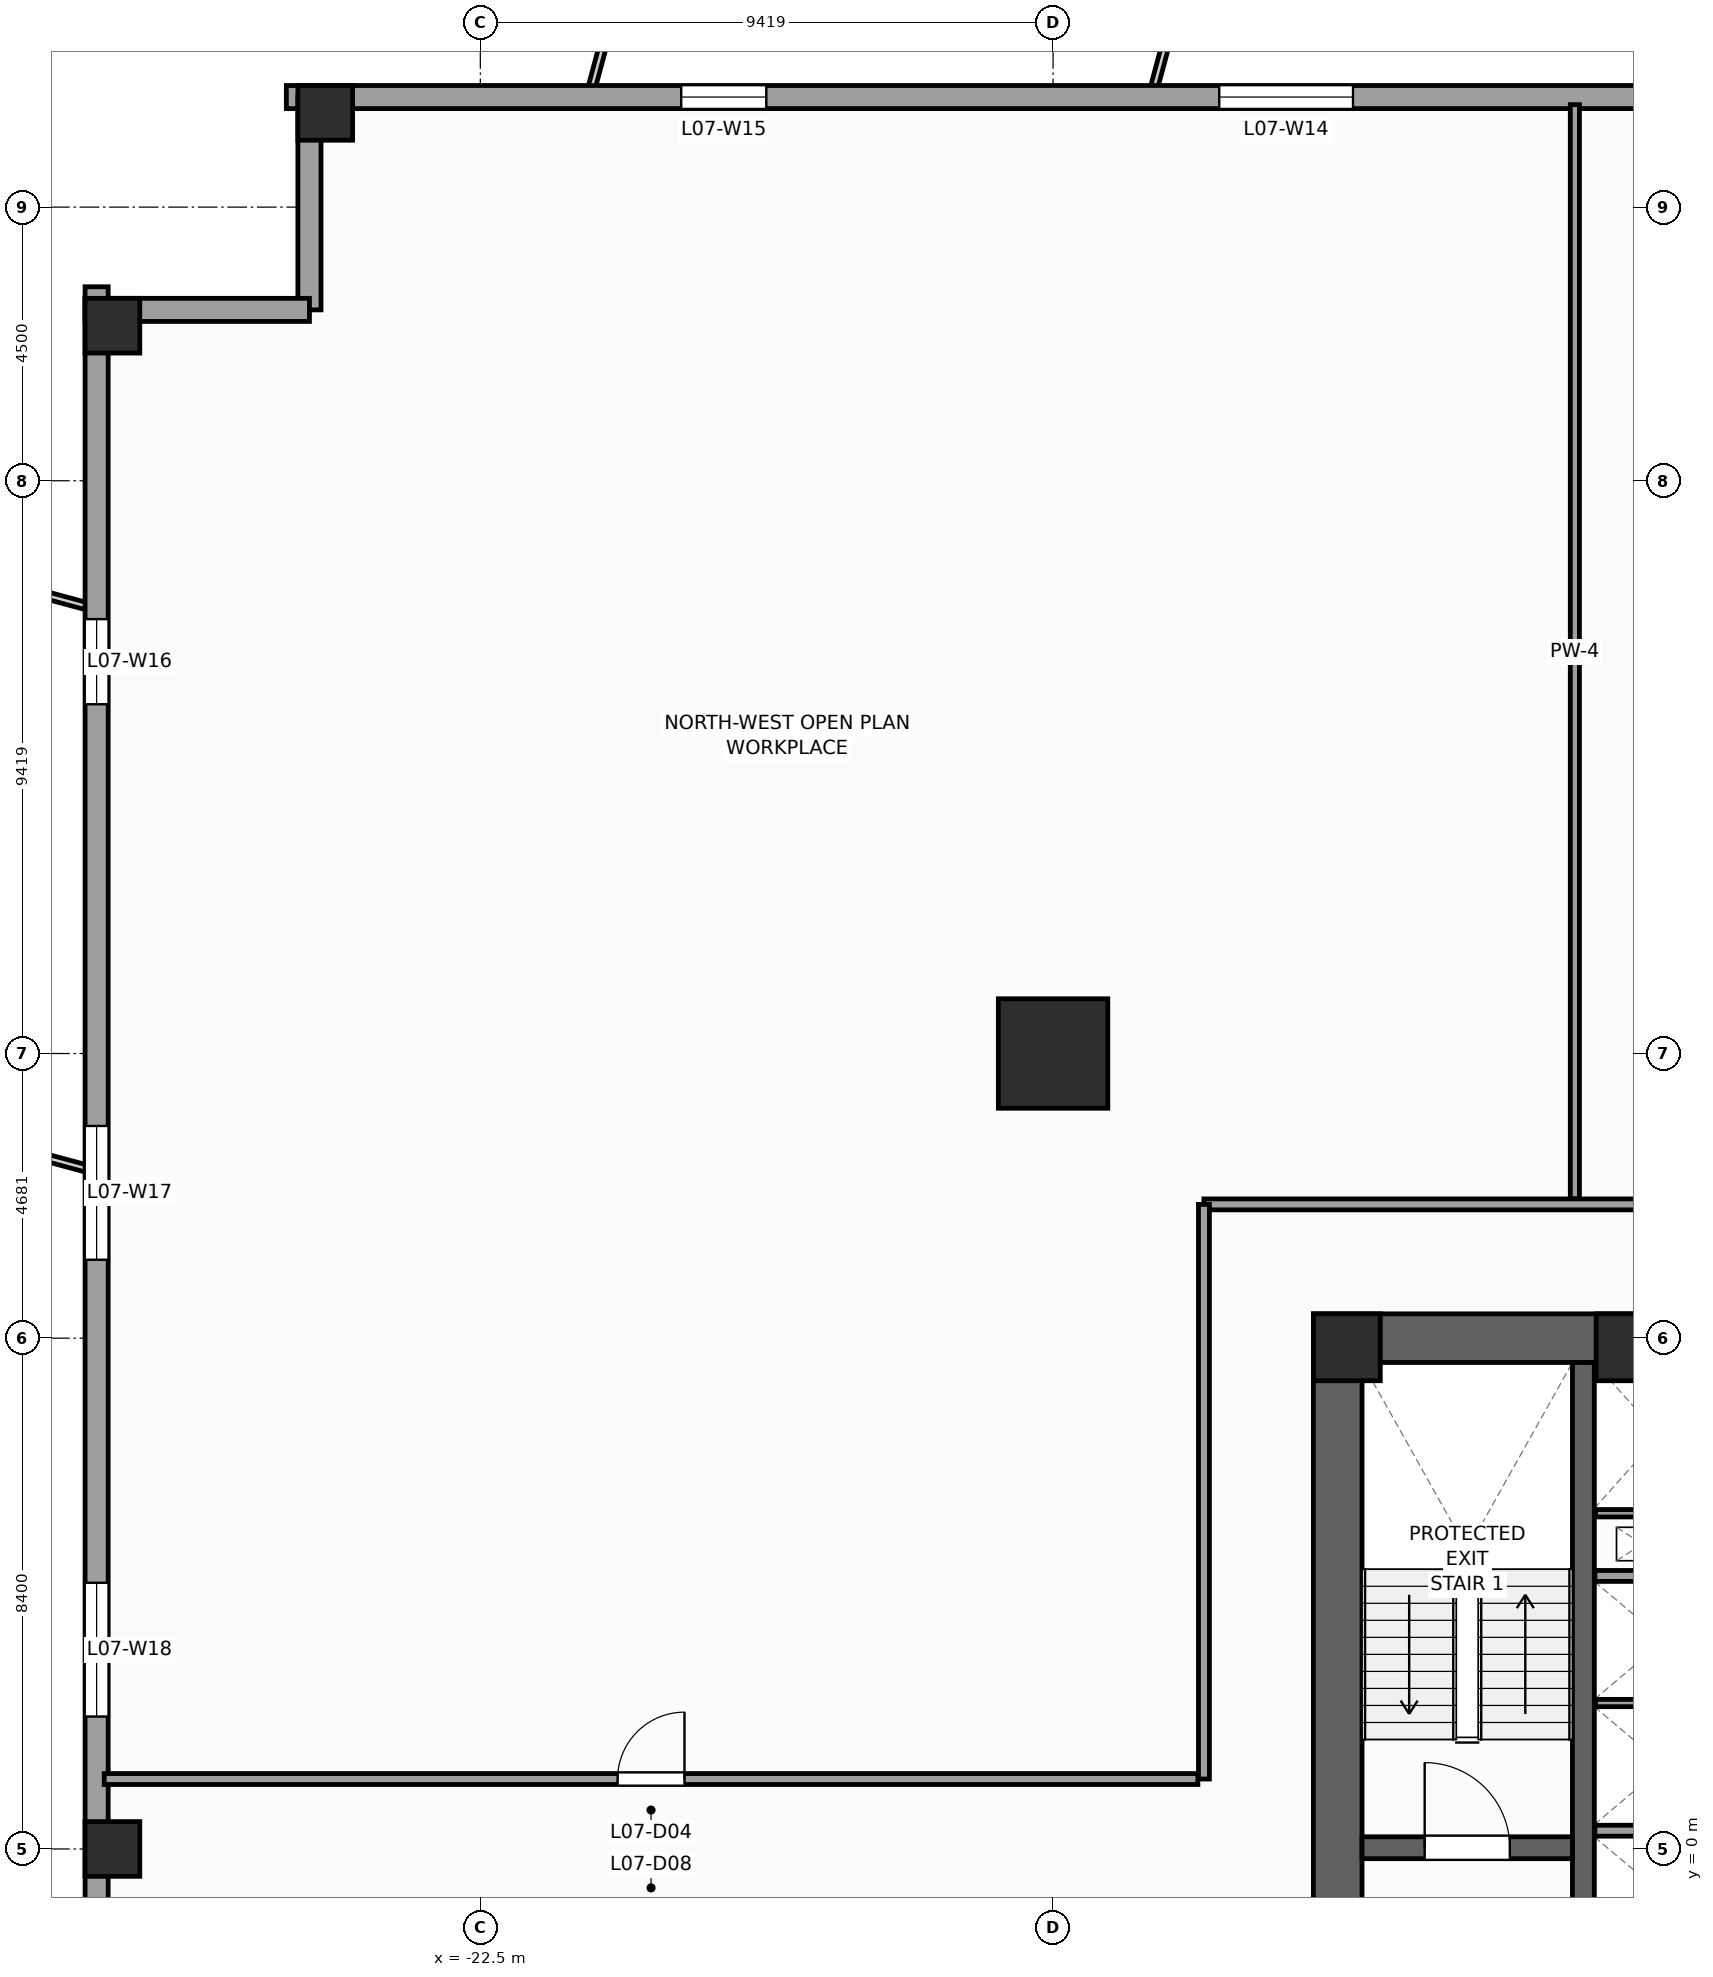
"""IFC4 building model, lengths in metres.
Left out: names, types, materials, properties, quantities, classifications, styles, units other than length and angle.
Written with IfcOpenShell. Run it as: python <this file> out.ifc"""

import sys

from ifc_helpers import new_model, si_unit, direction, frame, frame_2d, origin, origin_2d, place, context, subcontext, project, spatial, rectangle, extrude, source, transform, mapped, element, fill, save


model = new_model("IFC4")
c1 = context("Model", 3, precision=1e-05, world=origin(), true_north=direction((0.0, 1.0)))
c2 = subcontext(c1, "Body", "Model", "MODEL_VIEW")
j1 = project(units=[si_unit("LENGTHUNIT", "METRE"), si_unit("PLANEANGLEUNIT", "RADIAN")], contexts=[c1])
p1 = place(None, origin())
s1 = spatial("IfcSite", under=j1, at=p1, CompositionType="ELEMENT")
p2 = place(p1, origin())
s2 = spatial("IfcBuilding", under=s1, at=p2, CompositionType="ELEMENT")
p3 = place(p2, frame((0.0, 0.0, 34.0)))
s3 = spatial("IfcBuildingStorey", under=s2, at=p3, CompositionType="ELEMENT", Elevation=34.0)
p4 = place(p3, frame((-8.8, 8.4, 0.0), z_axis=(0.0, 0.0, 1.0), x_axis=(1.0, 0.0, 0.0)))
e1 = element("IfcWall", 1, at=p4, inside=s3, PredefinedType="SHEAR", context=c2, shape_type="SweptSolid", body=[
    extrude(rectangle(XDim=17.6, YDim=0.8, at=frame_2d((8.8, 0.0))), origin(), (0.0, 0.0, 1.0), 4.0),
])
p5 = place(p3, frame((-8.4, -8.0, 0.0), z_axis=(0.0, 0.0, 1.0), x_axis=(0.0, 1.0, 0.0)))
e2 = element("IfcWall", 2, at=p5, inside=s3, PredefinedType="SHEAR", context=c2, shape_type="SweptSolid", body=[
    extrude(rectangle(XDim=16.0, YDim=0.8, at=frame_2d((8.0, 0.0))), origin(), (0.0, 0.0, 1.0), 4.0),
])
p6 = place(p5, frame((4.69, 0.0, 0.0)))
e3 = element("IfcOpeningElement", 3, at=p6, cuts=e2, PredefinedType="OPENING", context=c2, shape_type="SweptSolid", body=[
    extrude(rectangle(XDim=1.3, YDim=2.2, at=frame_2d((0.65, 1.1))), frame((0.0, 0.41, 0.0), z_axis=(0.0, -1.0, 0.0), x_axis=(1.0, 0.0, 0.0)), (0.0, 0.0, 1.0), 0.82),
])
p7 = place(p3, frame((-4.36, -8.0, 0.0), z_axis=(0.0, 0.0, 1.0), x_axis=(0.0, 1.0, 0.0)))
e4 = element("IfcWall", 4, at=p7, inside=s3, PredefinedType="SHEAR", context=c2, shape_type="SweptSolid", body=[
    extrude(rectangle(XDim=16.0, YDim=0.36, at=frame_2d((8.0, 0.0))), origin(), (0.0, 0.0, 1.0), 4.0),
])
p8 = place(p3, frame((-8.0, 0.02, 0.0), z_axis=(0.0, 0.0, 1.0), x_axis=(1.0, 0.0, 0.0)))
e5 = element("IfcWall", 5, at=p8, inside=s3, PredefinedType="SHEAR", context=c2, shape_type="SweptSolid", body=[
    extrude(rectangle(XDim=3.46, YDim=0.36, at=frame_2d((1.73, 0.0))), origin(), (0.0, 0.0, 1.0), 4.0),
])
p9 = place(p8, frame((1.03, 0.0, 0.0)))
e6 = element("IfcOpeningElement", 6, at=p9, cuts=e5, PredefinedType="OPENING", context=c2, shape_type="SweptSolid", body=[
    extrude(rectangle(XDim=1.4, YDim=2.2, at=frame_2d((0.7, 1.1))), frame((0.0, 0.19, 0.0), z_axis=(0.0, -1.0, 0.0), x_axis=(1.0, 0.0, 0.0)), (0.0, 0.0, 1.0), 0.38),
])
m1 = source(origin(), c2, "Body", "SweptSolid", [
    extrude(rectangle(XDim=1.1, YDim=1.1, at=origin_2d()), origin(), (0.0, 0.0, 1.0), 4.0),
])
for number, where, z_axis, x_axis in (
    (7, (-8.25, 8.25, 0.0), (0.0, 0.0, 1.0), (1.0, 0.0, 0.0)),
    (8, (-3.6, 8.25, 0.0), (0.0, 0.0, 1.0), (1.0, 0.0, 0.0)),
):
    element("IfcColumn", number, at=place(p3, frame(where, z_axis=z_axis, x_axis=x_axis)), inside=s3, PredefinedType="PILASTER", context=c2, shape_type="MappedRepresentation", body=[
        mapped(m1, transform((0.0, 0.0, 0.0), scale=1.0)),
    ])
m2 = source(origin(), c2, "Body", "SweptSolid", [
    extrude(rectangle(XDim=1.8, YDim=1.8, at=origin_2d()), origin(), (0.0, 0.0, 1.0), 4.0),
])
p10 = place(p3, frame((-13.081, 13.081, 0.0), z_axis=(0.0, 0.0, 1.0), x_axis=(1.0, 0.0, 0.0)))
e9 = element("IfcColumn", 9, at=p10, inside=s3, PredefinedType="COLUMN", context=c2, shape_type="MappedRepresentation", body=[
    mapped(m2, transform((0.0, 0.0, 0.0), scale=1.0)),
])
m3 = source(origin(), c2, "Body", "SweptSolid", [
    extrude(rectangle(XDim=0.9, YDim=0.9, at=origin_2d()), origin(), (0.0, 0.0, 1.0), 4.0),
])
for number, where, z_axis, x_axis in (
    (10, (-25.05, 28.55, 0.0), (0.0, 0.0, 1.0), (1.0, 0.0, 0.0)),
    (11, (-28.55, 25.05, 0.0), (0.0, 0.0, 1.0), (1.0, 0.0, 0.0)),
    (12, (-28.55, 0.0, 0.0), (0.0, 0.0, 1.0), (1.0, 0.0, 0.0)),
):
    element("IfcColumn", number, at=place(p3, frame(where, z_axis=z_axis, x_axis=x_axis)), inside=s3, PredefinedType="COLUMN", context=c2, shape_type="MappedRepresentation", body=[
        mapped(m3, transform((0.0, 0.0, 0.0), scale=1.0)),
    ])
p11 = place(p3, frame((25.69, 28.81, 0.0), z_axis=(0.0, 0.0, 1.0), x_axis=(-1.0, 0.0, 0.0)))
e13 = element("IfcWall", 13, at=p11, inside=s3, PredefinedType="STANDARD", context=c2, shape_type="SweptSolid", body=[
    extrude(rectangle(XDim=51.38, YDim=0.38, at=frame_2d((25.69, 0.0))), origin(), (0.0, 0.0, 1.0), 3.12),
])
p12 = place(p11, frame((5.466, 0.0, 0.49)))
e14 = element("IfcOpeningElement", 14, at=p12, cuts=e13, PredefinedType="OPENING", context=c2, shape_type="SweptSolid", body=[
    extrude(rectangle(XDim=1.4, YDim=2.4, at=frame_2d((0.7, 1.2))), frame((0.0, 0.2, 0.0), z_axis=(0.0, -1.0, 0.0), x_axis=(1.0, 0.0, 0.0)), (0.0, 0.0, 1.0), 0.4),
])
p13 = place(p11, frame((13.8, 0.0, 0.49)))
e15 = element("IfcOpeningElement", 15, at=p13, cuts=e13, PredefinedType="OPENING", context=c2, shape_type="SweptSolid", body=[
    extrude(rectangle(XDim=2.2, YDim=2.4, at=frame_2d((1.1, 1.2))), frame((0.0, 0.2, 0.0), z_axis=(0.0, -1.0, 0.0), x_axis=(1.0, 0.0, 0.0)), (0.0, 0.0, 1.0), 0.4),
])
p14 = place(p11, frame((22.062, 0.0, 0.49)))
e16 = element("IfcOpeningElement", 16, at=p14, cuts=e13, PredefinedType="OPENING", context=c2, shape_type="SweptSolid", body=[
    extrude(rectangle(XDim=2.2, YDim=2.4, at=frame_2d((1.1, 1.2))), frame((0.0, 0.2, 0.0), z_axis=(0.0, -1.0, 0.0), x_axis=(1.0, 0.0, 0.0)), (0.0, 0.0, 1.0), 0.4),
])
p15 = place(p11, frame((33.838, 0.0, 0.49)))
e17 = element("IfcOpeningElement", 17, at=p15, cuts=e13, PredefinedType="OPENING", context=c2, shape_type="SweptSolid", body=[
    extrude(rectangle(XDim=2.2, YDim=2.4, at=frame_2d((1.1, 1.2))), frame((0.0, 0.2, 0.0), z_axis=(0.0, -1.0, 0.0), x_axis=(1.0, 0.0, 0.0)), (0.0, 0.0, 1.0), 0.4),
])
p16 = place(p11, frame((43.487, 0.0, 0.49)))
e18 = element("IfcOpeningElement", 18, at=p16, cuts=e13, PredefinedType="OPENING", context=c2, shape_type="SweptSolid", body=[
    extrude(rectangle(XDim=1.4, YDim=2.4, at=frame_2d((0.7, 1.2))), frame((0.0, 0.2, 0.0), z_axis=(0.0, -1.0, 0.0), x_axis=(1.0, 0.0, 0.0)), (0.0, 0.0, 1.0), 0.4),
])
p17 = place(p3, frame((-25.31, 28.81, 0.0), z_axis=(0.0, 0.0, 1.0), x_axis=(0.0, -1.0, 0.0)))
e19 = element("IfcWall", 19, at=p17, inside=s3, PredefinedType="STANDARD", context=c2, shape_type="SweptSolid", body=[
    extrude(rectangle(XDim=3.5, YDim=0.38, at=frame_2d((1.75, 0.0))), origin(), (0.0, 0.0, 1.0), 3.72),
])
p18 = place(p3, frame((-25.31, 25.31, 0.0), z_axis=(0.0, 0.0, 1.0), x_axis=(-1.0, 0.0, 0.0)))
e20 = element("IfcWall", 20, at=p18, inside=s3, PredefinedType="STANDARD", context=c2, shape_type="SweptSolid", body=[
    extrude(rectangle(XDim=3.69, YDim=0.38, at=frame_2d((1.845, 0.0))), origin(), (0.0, 0.0, 1.0), 3.72),
])
p19 = place(p3, frame((-28.81, 25.69, 0.0), z_axis=(0.0, 0.0, 1.0), x_axis=(0.0, -1.0, 0.0)))
e21 = element("IfcWall", 21, at=p19, inside=s3, PredefinedType="STANDARD", context=c2, shape_type="SweptSolid", body=[
    extrude(rectangle(XDim=51.38, YDim=0.38, at=frame_2d((25.69, 0.0))), origin(), (0.0, 0.0, 1.0), 3.12),
])
p20 = place(p19, frame((30.765, 0.0, 0.0)))
e22 = element("IfcOpeningElement", 22, at=p20, cuts=e21, PredefinedType="OPENING", context=c2, shape_type="SweptSolid", body=[
    extrude(rectangle(XDim=1.05, YDim=2.25, at=frame_2d((0.525, 1.125))), frame((0.0, 0.2, 0.0), z_axis=(0.0, -1.0, 0.0), x_axis=(1.0, 0.0, 0.0)), (0.0, 0.0, 1.0), 0.4),
])
p21 = place(p19, frame((5.466, 0.0, 0.49)))
e23 = element("IfcOpeningElement", 23, at=p21, cuts=e21, PredefinedType="OPENING", context=c2, shape_type="SweptSolid", body=[
    extrude(rectangle(XDim=1.4, YDim=2.4, at=frame_2d((0.7, 1.2))), frame((0.0, 0.2, 0.0), z_axis=(0.0, -1.0, 0.0), x_axis=(1.0, 0.0, 0.0)), (0.0, 0.0, 1.0), 0.4),
])
p22 = place(p19, frame((13.8, 0.0, 0.49)))
e24 = element("IfcOpeningElement", 24, at=p22, cuts=e21, PredefinedType="OPENING", context=c2, shape_type="SweptSolid", body=[
    extrude(rectangle(XDim=2.2, YDim=2.4, at=frame_2d((1.1, 1.2))), frame((0.0, 0.2, 0.0), z_axis=(0.0, -1.0, 0.0), x_axis=(1.0, 0.0, 0.0)), (0.0, 0.0, 1.0), 0.4),
])
p23 = place(p19, frame((21.312, 0.0, 0.49)))
e25 = element("IfcOpeningElement", 25, at=p23, cuts=e21, PredefinedType="OPENING", context=c2, shape_type="SweptSolid", body=[
    extrude(rectangle(XDim=2.2, YDim=2.4, at=frame_2d((1.1, 1.2))), frame((0.0, 0.2, 0.0), z_axis=(0.0, -1.0, 0.0), x_axis=(1.0, 0.0, 0.0)), (0.0, 0.0, 1.0), 0.4),
])
p24 = place(p19, frame((33.838, 0.0, 0.49)))
e26 = element("IfcOpeningElement", 26, at=p24, cuts=e21, PredefinedType="OPENING", context=c2, shape_type="SweptSolid", body=[
    extrude(rectangle(XDim=2.2, YDim=2.4, at=frame_2d((1.1, 1.2))), frame((0.0, 0.2, 0.0), z_axis=(0.0, -1.0, 0.0), x_axis=(1.0, 0.0, 0.0)), (0.0, 0.0, 1.0), 0.4),
])
p25 = place(p19, frame((43.487, 0.0, 0.49)))
e27 = element("IfcOpeningElement", 27, at=p25, cuts=e21, PredefinedType="OPENING", context=c2, shape_type="SweptSolid", body=[
    extrude(rectangle(XDim=1.4, YDim=2.4, at=frame_2d((0.7, 1.2))), frame((0.0, 0.2, 0.0), z_axis=(0.0, -1.0, 0.0), x_axis=(1.0, 0.0, 0.0)), (0.0, 0.0, 1.0), 0.4),
])
for number, where, z_axis, x_axis in (
    (28, (-4.17, 0.3, 0.0), (0.0, 0.0, 1.0), (1.0, 0.0, 0.0)),
    (29, (-4.17, 4.49, 0.0), (0.0, 0.0, 1.0), (1.0, 0.0, 0.0)),
):
    element("IfcWall", number, at=place(p3, frame(where, z_axis=z_axis, x_axis=x_axis)), inside=s3, PredefinedType="PARTITIONING", context=c2, shape_type="SweptSolid", body=[
        extrude(rectangle(XDim=2.28, YDim=0.18, at=frame_2d((1.14, 0.0))), origin(), (0.0, 0.0, 1.0), 3.72),
    ])
p26 = place(p3, frame((-4.16, 2.4, 0.0), z_axis=(0.0, 0.0, 1.0), x_axis=(1.0, 0.0, 0.0)))
e30 = element("IfcWall", 30, at=p26, inside=s3, PredefinedType="PARTITIONING", context=c2, shape_type="SweptSolid", body=[
    extrude(rectangle(XDim=2.26, YDim=0.12, at=frame_2d((1.13, 0.0))), origin(), (0.0, 0.0, 1.0), 3.72),
])
p27 = place(p3, frame((-4.16, 5.52, 0.0), z_axis=(0.0, 0.0, 1.0), x_axis=(1.0, 0.0, 0.0)))
e31 = element("IfcWall", 31, at=p27, inside=s3, PredefinedType="PARTITIONING", context=c2, shape_type="SweptSolid", body=[
    extrude(rectangle(XDim=2.1, YDim=0.12, at=frame_2d((1.05, 0.0))), origin(), (0.0, 0.0, 1.0), 3.72),
])
p28 = place(p3, frame((-10.6, 10.6, 0.0), z_axis=(0.0, 0.0, 1.0), x_axis=(1.0, 0.0, 0.0)))
e32 = element("IfcWall", 32, at=p28, inside=s3, PredefinedType="PARTITIONING", context=c2, shape_type="SweptSolid", body=[
    extrude(rectangle(XDim=21.2, YDim=0.18, at=frame_2d((10.6, 0.0))), origin(), (0.0, 0.0, 1.0), 3.72),
])
p29 = place(p28, frame((10.05, 0.0, 0.0)))
e33 = element("IfcOpeningElement", 33, at=p29, cuts=e32, PredefinedType="OPENING", context=c2, shape_type="SweptSolid", body=[
    extrude(rectangle(XDim=1.1, YDim=2.2, at=frame_2d((0.55, 1.1))), frame((0.0, 0.1, 0.0), z_axis=(0.0, -1.0, 0.0), x_axis=(1.0, 0.0, 0.0)), (0.0, 0.0, 1.0), 0.2),
])
p30 = place(p3, frame((-10.6, 1.15, 0.0), z_axis=(0.0, 0.0, 1.0), x_axis=(0.0, 1.0, 0.0)))
e34 = element("IfcWall", 34, at=p30, inside=s3, PredefinedType="PARTITIONING", context=c2, shape_type="SweptSolid", body=[
    extrude(rectangle(XDim=9.45, YDim=0.18, at=frame_2d((4.725, 0.0))), origin(), (0.0, 0.0, 1.0), 3.72),
])
p31 = place(p3, frame((-28.685, 1.15, 0.0), z_axis=(0.0, 0.0, 1.0), x_axis=(1.0, 0.0, 0.0)))
e35 = element("IfcWall", 35, at=p31, inside=s3, PredefinedType="PARTITIONING", context=c2, shape_type="SweptSolid", body=[
    extrude(rectangle(XDim=17.985, YDim=0.18, at=frame_2d((8.993, 0.0))), origin(), (0.0, 0.0, 1.0), 3.72),
])
p32 = place(p31, frame((8.442, 0.0, 0.0)))
e36 = element("IfcOpeningElement", 36, at=p32, cuts=e35, PredefinedType="OPENING", context=c2, shape_type="SweptSolid", body=[
    extrude(rectangle(XDim=1.1, YDim=2.2, at=frame_2d((0.55, 1.1))), frame((0.0, 0.1, 0.0), z_axis=(0.0, -1.0, 0.0), x_axis=(1.0, 0.0, 0.0)), (0.0, 0.0, 1.0), 0.2),
])
p33 = place(p3, frame((-4.5, 10.695, 0.0), z_axis=(0.0, 0.0, 1.0), x_axis=(0.0, 1.0, 0.0)))
e37 = element("IfcWall", 37, at=p33, inside=s3, PredefinedType="PARTITIONING", context=c2, shape_type="SweptSolid", body=[
    extrude(rectangle(XDim=17.99, YDim=0.15, at=frame_2d((8.995, 0.0))), origin(), (0.0, 0.0, 1.0), 3.72),
])
m4 = source(origin(), c2, "Body", "SweptSolid", [
    extrude(rectangle(XDim=2.2, YDim=2.4, at=frame_2d((1.1, 1.2))), frame((0.0, 0.03, 0.0), z_axis=(0.0, -1.0, 0.0), x_axis=(1.0, 0.0, 0.0)), (0.0, 0.0, 1.0), 0.06),
])
p34 = place(p15, origin())
e38 = element("IfcWindow", 38, at=p34, inside=s3, PartitioningType="SINGLE_PANEL", PredefinedType="WINDOW", context=c2, shape_type="MappedRepresentation", body=[
    mapped(m4, transform((0.0, 0.0, 0.0), scale=1.0)),
])
fill(e17, e38)
m5 = source(origin(), c2, "Body", "SweptSolid", [
    extrude(rectangle(XDim=1.4, YDim=2.4, at=frame_2d((0.7, 1.2))), frame((0.0, 0.03, 0.0), z_axis=(0.0, -1.0, 0.0), x_axis=(1.0, 0.0, 0.0)), (0.0, 0.0, 1.0), 0.06),
])
p35 = place(p16, origin())
e39 = element("IfcWindow", 39, at=p35, inside=s3, PartitioningType="SINGLE_PANEL", PredefinedType="WINDOW", context=c2, shape_type="MappedRepresentation", body=[
    mapped(m5, transform((0.0, 0.0, 0.0), scale=1.0)),
])
fill(e18, e39)
p36 = place(p21, origin())
e40 = element("IfcWindow", 40, at=p36, inside=s3, PartitioningType="SINGLE_PANEL", PredefinedType="WINDOW", context=c2, shape_type="MappedRepresentation", body=[
    mapped(m5, transform((0.0, 0.0, 0.0), scale=1.0)),
])
fill(e23, e40)
p37 = place(p22, origin())
e41 = element("IfcWindow", 41, at=p37, inside=s3, PartitioningType="SINGLE_PANEL", PredefinedType="WINDOW", context=c2, shape_type="MappedRepresentation", body=[
    mapped(m4, transform((0.0, 0.0, 0.0), scale=1.0)),
])
fill(e24, e41)
p38 = place(p23, origin())
e42 = element("IfcWindow", 42, at=p38, inside=s3, PartitioningType="SINGLE_PANEL", PredefinedType="WINDOW", context=c2, shape_type="MappedRepresentation", body=[
    mapped(m4, transform((0.0, 0.0, 0.0), scale=1.0)),
])
fill(e25, e42)
m6 = source(origin(), c2, "Body", "SweptSolid", [
    extrude(rectangle(XDim=1.4, YDim=2.2, at=frame_2d((0.7, 1.1))), frame((0.0, 0.025, 0.0), z_axis=(0.0, -1.0, 0.0), x_axis=(1.0, 0.0, 0.0)), (0.0, 0.0, 1.0), 0.05),
])
p39 = place(p9, origin())
e43 = element("IfcDoor", 43, at=p39, inside=s3, OperationType="SINGLE_SWING_LEFT", PredefinedType="DOOR", context=c2, shape_type="MappedRepresentation", body=[
    mapped(m6, transform((0.0, 0.0, 0.0), scale=1.0)),
])
fill(e6, e43)
m7 = source(origin(), c2, "Body", "SweptSolid", [
    extrude(rectangle(XDim=1.1, YDim=2.2, at=frame_2d((0.55, 1.1))), frame((0.0, 0.025, 0.0), z_axis=(0.0, -1.0, 0.0), x_axis=(1.0, 0.0, 0.0)), (0.0, 0.0, 1.0), 0.05),
])
p40 = place(p32, origin())
e44 = element("IfcDoor", 44, at=p40, inside=s3, OperationType="SINGLE_SWING_RIGHT", PredefinedType="DOOR", context=c2, shape_type="MappedRepresentation", body=[
    mapped(m7, transform((0.0, 0.0, 0.0), scale=1.0)),
])
fill(e36, e44)
save(model, sys.argv[1])
